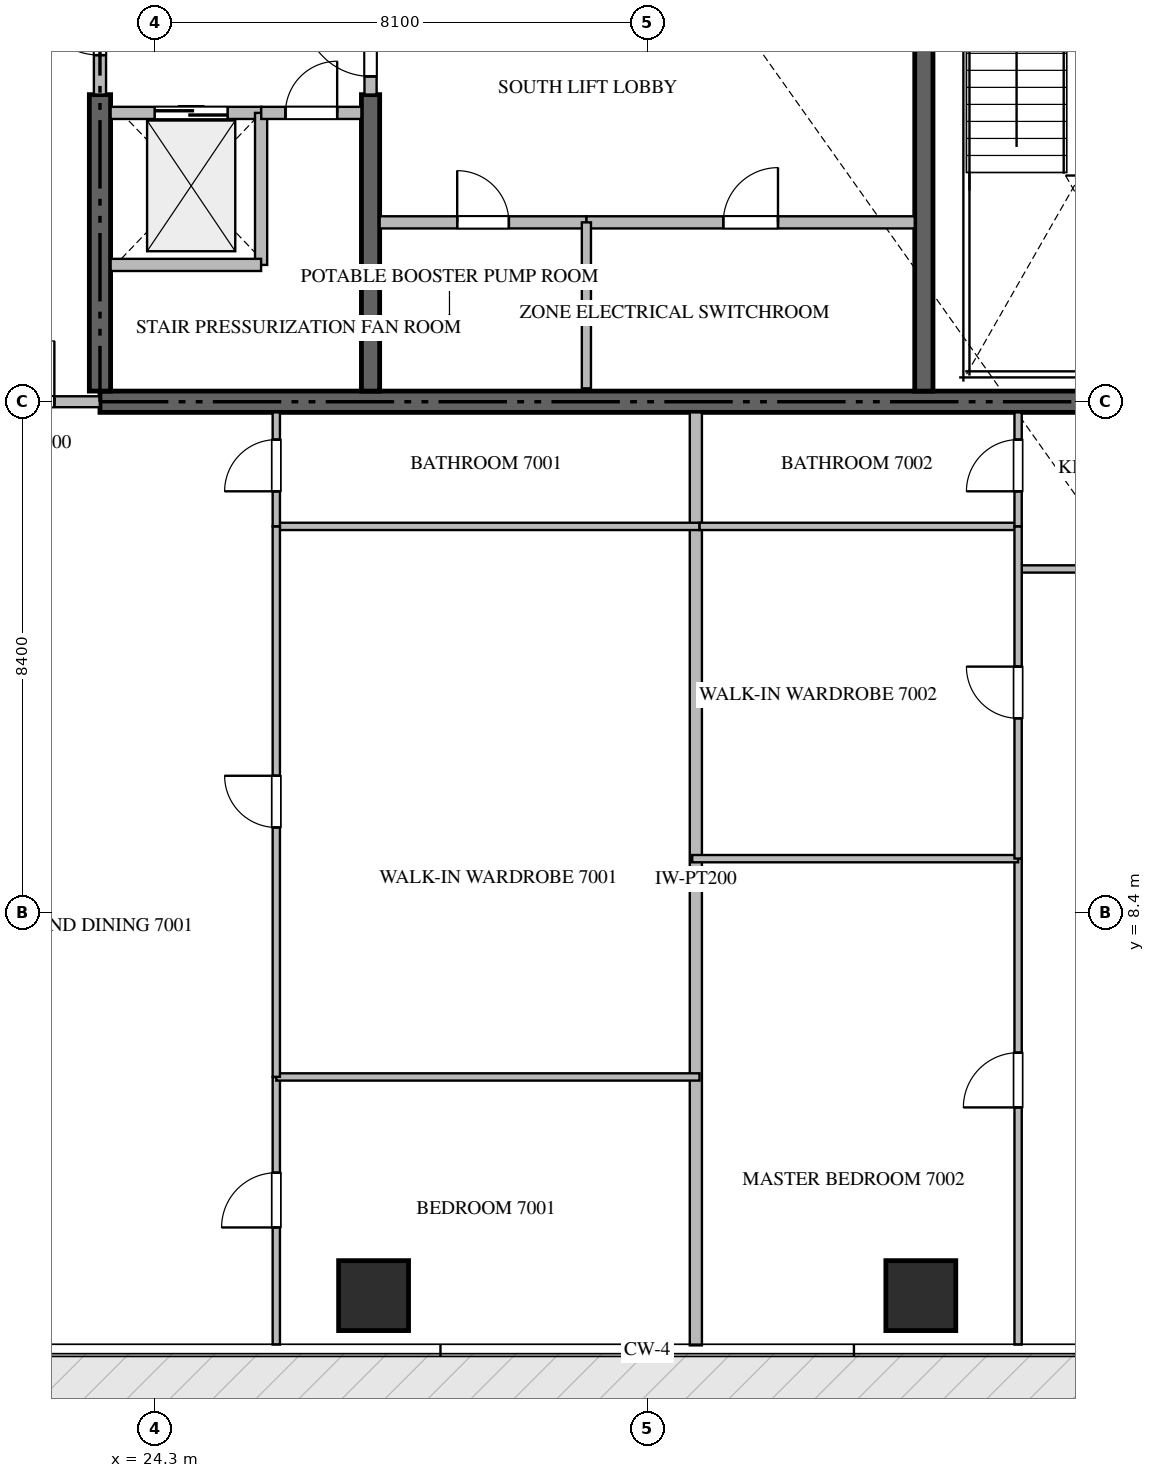
"""IFC4 building model, lengths in metres.
Left out: names, types, materials, properties, quantities, classifications, styles, units other than length and angle.
Written with IfcOpenShell. Run it as: python <this file> out.ifc"""

import sys

from ifc_helpers import new_model, si_unit, direction, frame, frame_2d, origin, origin_2d, place, context, subcontext, project, spatial, rectangle, extrude, source, transform, mapped, element, fill, save


model = new_model("IFC4")
c1 = context("Model", 3, precision=1e-05, world=origin(), true_north=direction((0.0, 1.0)))
c2 = subcontext(c1, "Body", "Model", "MODEL_VIEW")
j1 = project(units=[si_unit("LENGTHUNIT", "METRE"), si_unit("PLANEANGLEUNIT", "RADIAN")], contexts=[c1])
p1 = place(None, origin())
s1 = spatial("IfcSite", under=j1, at=p1, CompositionType="ELEMENT")
p2 = place(p1, origin())
s2 = spatial("IfcBuilding", under=s1, at=p2, CompositionType="ELEMENT")
p3 = place(p2, frame((0.0, 0.0, 279.75)))
s3 = spatial("IfcBuildingStorey", under=s2, at=p3, CompositionType="ELEMENT", Elevation=279.75)
p4 = place(p3, frame((23.4, 16.8, -0.26), z_axis=(0.0, 0.0, 1.0), x_axis=(1.0, 0.0, 0.0)))
e1 = element("IfcWall", 1, at=p4, inside=s3, PredefinedType="SHEAR", context=c2, shape_type="SweptSolid", body=[
    extrude(rectangle(XDim=18.0, YDim=0.35, at=frame_2d((9.0, 0.0))), origin(), (0.0, 0.0, 1.0), 3.848),
])
p5 = place(p3, frame((23.4, 16.975, -0.26), z_axis=(0.0, 0.0, 1.0), x_axis=(0.0, 1.0, 0.0)))
e2 = element("IfcWall", 2, at=p5, inside=s3, PredefinedType="SHEAR", context=c2, shape_type="SweptSolid", body=[
    extrude(rectangle(XDim=4.875, YDim=0.35, at=frame_2d((2.438, 0.0))), origin(), (0.0, 0.0, 1.0), 3.848),
])
p6 = place(p3, frame((27.85, 16.975, -0.26), z_axis=(0.0, 0.0, 1.0), x_axis=(0.0, 1.0, 0.0)))
e3 = element("IfcWall", 3, at=p6, inside=s3, PredefinedType="SHEAR", context=c2, shape_type="SweptSolid", body=[
    extrude(rectangle(XDim=4.875, YDim=0.3, at=frame_2d((2.438, 0.0))), origin(), (0.0, 0.0, 1.0), 3.848),
])
p7 = place(p3, frame((36.95, 16.975, -0.26), z_axis=(0.0, 0.0, 1.0), x_axis=(0.0, 1.0, 0.0)))
e4 = element("IfcWall", 4, at=p7, inside=s3, PredefinedType="SHEAR", context=c2, shape_type="SweptSolid", body=[
    extrude(rectangle(XDim=8.375, YDim=0.3, at=frame_2d((4.188, 0.0))), origin(), (0.0, 0.0, 1.0), 3.848),
])
m1 = source(origin(), c2, "Body", "SweptSolid", [
    extrude(rectangle(XDim=1.15, YDim=1.15, at=origin_2d()), origin(), (0.0, 0.0, 1.0), 3.85),
])
for number, where, z_axis, x_axis in (
    (5, (27.9, 2.1, -0.26), (0.0, 0.0, 1.0), (1.0, 0.0, 0.0)),
    (6, (36.9, 2.1, -0.26), (0.0, 0.0, 1.0), (1.0, 0.0, 0.0)),
):
    element("IfcColumn", number, at=place(p3, frame(where, z_axis=z_axis, x_axis=x_axis)), inside=s3, PredefinedType="COLUMN", context=c2, shape_type="MappedRepresentation", body=[
        mapped(m1, transform((0.0, 0.0, 0.0), scale=1.0)),
    ])
p8 = place(p3, frame((23.575, 21.55, 0.0), z_axis=(0.0, 0.0, 1.0), x_axis=(1.0, 0.0, 0.0)))
e7 = element("IfcWall", 7, at=p8, inside=s3, PredefinedType="STANDARD", context=c2, shape_type="SweptSolid", body=[
    extrude(rectangle(XDim=2.475, YDim=0.2, at=frame_2d((1.238, 0.0))), origin(), (0.0, 0.0, 1.0), 3.59),
])
p9 = place(p8, frame((0.725, 0.0, 0.0)))
e8 = element("IfcOpeningElement", 8, at=p9, cuts=e7, PredefinedType="OPENING", context=c2, shape_type="SweptSolid", body=[
    extrude(rectangle(XDim=1.2, YDim=2.2, at=frame_2d((0.6, 1.1))), frame((0.0, 0.11, 0.0), z_axis=(0.0, -1.0, 0.0), x_axis=(1.0, 0.0, 0.0)), (0.0, 0.0, 1.0), 0.22),
])
p10 = place(p3, frame((26.05, 19.05, 0.0), z_axis=(0.0, 0.0, 1.0), x_axis=(0.0, 1.0, 0.0)))
e9 = element("IfcWall", 9, at=p10, inside=s3, PredefinedType="STANDARD", context=c2, shape_type="SweptSolid", body=[
    extrude(rectangle(XDim=2.5, YDim=0.2, at=frame_2d((1.25, 0.0))), origin(), (0.0, 0.0, 1.0), 3.59),
])
p11 = place(p3, frame((23.575, 19.05, 0.0), z_axis=(0.0, 0.0, 1.0), x_axis=(1.0, 0.0, 0.0)))
e10 = element("IfcWall", 10, at=p11, inside=s3, PredefinedType="STANDARD", context=c2, shape_type="SweptSolid", body=[
    extrude(rectangle(XDim=2.475, YDim=0.2, at=frame_2d((1.238, 0.0))), origin(), (0.0, 0.0, 1.0), 3.59),
])
p12 = place(p3, frame((26.052, 21.55, 0.0), z_axis=(0.0, 0.0, 1.0), x_axis=(1.0, 0.0, 0.0)))
e11 = element("IfcWall", 11, at=p12, inside=s3, PredefinedType="STANDARD", context=c2, shape_type="SweptSolid", body=[
    extrude(rectangle(XDim=1.648, YDim=0.2, at=frame_2d((0.824, 0.0))), origin(), (0.0, 0.0, 1.0), 3.59),
])
p13 = place(p12, frame((0.399, 0.0, 0.0)))
e12 = element("IfcOpeningElement", 12, at=p13, cuts=e11, PredefinedType="OPENING", context=c2, shape_type="SweptSolid", body=[
    extrude(rectangle(XDim=0.85, YDim=2.1, at=frame_2d((0.425, 1.05))), frame((0.0, 0.11, 0.0), z_axis=(0.0, -1.0, 0.0), x_axis=(1.0, 0.0, 0.0)), (0.0, 0.0, 1.0), 0.22),
])
p14 = place(p3, frame((23.4, 21.852, 0.0), z_axis=(0.0, 0.0, 1.0), x_axis=(0.0, 1.0, 0.0)))
e13 = element("IfcWall", 13, at=p14, inside=s3, PredefinedType="STANDARD", context=c2, shape_type="SweptSolid", body=[
    extrude(rectangle(XDim=2.396, YDim=0.2, at=frame_2d((1.198, 0.0))), origin(), (0.0, 0.0, 1.0), 3.59),
])
p15 = place(p14, frame((0.648, 0.0, 0.0)))
e14 = element("IfcOpeningElement", 14, at=p15, cuts=e13, PredefinedType="OPENING", context=c2, shape_type="SweptSolid", body=[
    extrude(rectangle(XDim=1.1, YDim=2.15, at=frame_2d((0.55, 1.075))), frame((0.0, 0.11, 0.0), z_axis=(0.0, -1.0, 0.0), x_axis=(1.0, 0.0, 0.0)), (0.0, 0.0, 1.0), 0.22),
])
p16 = place(p3, frame((27.85, 21.852, 0.0), z_axis=(0.0, 0.0, 1.0), x_axis=(0.0, 1.0, 0.0)))
e15 = element("IfcWall", 15, at=p16, inside=s3, PredefinedType="STANDARD", context=c2, shape_type="SweptSolid", body=[
    extrude(rectangle(XDim=1.696, YDim=0.2, at=frame_2d((0.848, 0.0))), origin(), (0.0, 0.0, 1.0), 3.59),
])
p17 = place(p16, frame((0.298, 0.0, 0.0)))
e16 = element("IfcOpeningElement", 16, at=p17, cuts=e15, PredefinedType="OPENING", context=c2, shape_type="SweptSolid", body=[
    extrude(rectangle(XDim=1.1, YDim=2.15, at=frame_2d((0.55, 1.075))), frame((0.0, 0.11, 0.0), z_axis=(0.0, -1.0, 0.0), x_axis=(1.0, 0.0, 0.0)), (0.0, 0.0, 1.0), 0.22),
])
p18 = place(p3, frame((28.0, 19.75, 0.0), z_axis=(0.0, 0.0, 1.0), x_axis=(1.0, 0.0, 0.0)))
e17 = element("IfcWall", 17, at=p18, inside=s3, PredefinedType="STANDARD", context=c2, shape_type="SweptSolid", body=[
    extrude(rectangle(XDim=3.4, YDim=0.2, at=frame_2d((1.7, 0.0))), origin(), (0.0, 0.0, 1.0), 3.59),
])
p19 = place(p18, frame((1.275, 0.0, 0.0)))
e18 = element("IfcOpeningElement", 18, at=p19, cuts=e17, PredefinedType="OPENING", context=c2, shape_type="SweptSolid", body=[
    extrude(rectangle(XDim=0.85, YDim=2.1, at=frame_2d((0.425, 1.05))), frame((0.0, 0.11, 0.0), z_axis=(0.0, -1.0, 0.0), x_axis=(1.0, 0.0, 0.0)), (0.0, 0.0, 1.0), 0.22),
])
p20 = place(p3, frame((31.402, 19.75, 0.0), z_axis=(0.0, 0.0, 1.0), x_axis=(1.0, 0.0, 0.0)))
e19 = element("IfcWall", 19, at=p20, inside=s3, PredefinedType="STANDARD", context=c2, shape_type="SweptSolid", body=[
    extrude(rectangle(XDim=5.398, YDim=0.2, at=frame_2d((2.699, 0.0))), origin(), (0.0, 0.0, 1.0), 3.59),
])
p21 = place(p20, frame((2.249, 0.0, 0.0)))
e20 = element("IfcOpeningElement", 20, at=p21, cuts=e19, PredefinedType="OPENING", context=c2, shape_type="SweptSolid", body=[
    extrude(rectangle(XDim=0.9, YDim=2.1, at=frame_2d((0.45, 1.05))), frame((0.0, 0.11, 0.0), z_axis=(0.0, -1.0, 0.0), x_axis=(1.0, 0.0, 0.0)), (0.0, 0.0, 1.0), 0.22),
])
p22 = place(p3, frame((31.4, 17.02, 0.0), z_axis=(0.0, 0.0, 1.0), x_axis=(0.0, 1.0, 0.0)))
e21 = element("IfcWall", 21, at=p22, inside=s3, PredefinedType="PARTITIONING", context=c2, shape_type="SweptSolid", body=[
    extrude(rectangle(XDim=2.73, YDim=0.15, at=frame_2d((1.365, 0.0))), origin(), (0.0, 0.0, 1.0), 3.59),
])
p23 = place(p3, frame((33.2, 1.282, 0.0), z_axis=(0.0, 0.0, 1.0), x_axis=(0.0, 1.0, 0.0)))
e22 = element("IfcWall", 22, at=p23, inside=s3, PredefinedType="PARTITIONING", context=c2, shape_type="SweptSolid", body=[
    extrude(rectangle(XDim=15.343, YDim=0.2, at=frame_2d((7.671, 0.0))), origin(), (0.0, 0.0, 1.0), 3.59),
])
p24 = place(p3, frame((20.902, 16.8, 0.0), z_axis=(0.0, 0.0, 1.0), x_axis=(1.0, 0.0, 0.0)))
e23 = element("IfcWall", 23, at=p24, inside=s3, PredefinedType="PARTITIONING", context=c2, shape_type="SweptSolid", body=[
    extrude(rectangle(XDim=2.496, YDim=0.18, at=frame_2d((1.248, 0.0))), origin(), (0.0, 0.0, 1.0), 3.59),
])
p25 = place(p24, frame((0.748, 0.0, 0.0)))
e24 = element("IfcOpeningElement", 24, at=p25, cuts=e23, PredefinedType="OPENING", context=c2, shape_type="SweptSolid", body=[
    extrude(rectangle(XDim=1.0, YDim=2.15, at=frame_2d((0.5, 1.075))), frame((0.0, 0.1, 0.0), z_axis=(0.0, -1.0, 0.0), x_axis=(1.0, 0.0, 0.0)), (0.0, 0.0, 1.0), 0.2),
])
p26 = place(p3, frame((26.3, 1.295, 0.0), z_axis=(0.0, 0.0, 1.0), x_axis=(0.0, 1.0, 0.0)))
e25 = element("IfcWall", 25, at=p26, inside=s3, PredefinedType="PARTITIONING", context=c2, shape_type="SweptSolid", body=[
    extrude(rectangle(XDim=4.401, YDim=0.12, at=frame_2d((2.201, 0.0))), origin(), (0.0, 0.0, 1.0), 3.59),
])
p27 = place(p26, frame((1.926, 0.0, 0.0)))
e26 = element("IfcOpeningElement", 26, at=p27, cuts=e25, PredefinedType="OPENING", context=c2, shape_type="SweptSolid", body=[
    extrude(rectangle(XDim=0.9, YDim=2.1, at=frame_2d((0.45, 1.05))), frame((0.0, 0.07, 0.0), z_axis=(0.0, -1.0, 0.0), x_axis=(1.0, 0.0, 0.0)), (0.0, 0.0, 1.0), 0.14),
])
for number, where, z_axis, x_axis in (
    (27, (26.3, 5.696, 0.0), (0.0, 0.0, 1.0), (1.0, 0.0, 0.0)),
    (28, (26.3, 14.75, 0.0), (0.0, 0.0, 1.0), (1.0, 0.0, 0.0)),
):
    element("IfcWall", number, at=place(p3, frame(where, z_axis=z_axis, x_axis=x_axis)), inside=s3, PredefinedType="PARTITIONING", context=c2, shape_type="SweptSolid", body=[
        extrude(rectangle(XDim=6.96, YDim=0.12, at=frame_2d((3.48, 0.0))), origin(), (0.0, 0.0, 1.0), 3.59),
    ])
p28 = place(p3, frame((26.3, 5.698, 0.0), z_axis=(0.0, 0.0, 1.0), x_axis=(0.0, 1.0, 0.0)))
e29 = element("IfcWall", 29, at=p28, inside=s3, PredefinedType="PARTITIONING", context=c2, shape_type="SweptSolid", body=[
    extrude(rectangle(XDim=9.052, YDim=0.12, at=frame_2d((4.526, 0.0))), origin(), (0.0, 0.0, 1.0), 3.59),
])
p29 = place(p28, frame((4.101, 0.0, 0.0)))
e30 = element("IfcOpeningElement", 30, at=p29, cuts=e29, PredefinedType="OPENING", context=c2, shape_type="SweptSolid", body=[
    extrude(rectangle(XDim=0.85, YDim=2.1, at=frame_2d((0.425, 1.05))), frame((0.0, 0.07, 0.0), z_axis=(0.0, -1.0, 0.0), x_axis=(1.0, 0.0, 0.0)), (0.0, 0.0, 1.0), 0.14),
])
p30 = place(p3, frame((26.3, 14.752, 0.0), z_axis=(0.0, 0.0, 1.0), x_axis=(0.0, 1.0, 0.0)))
e31 = element("IfcWall", 31, at=p30, inside=s3, PredefinedType="PARTITIONING", context=c2, shape_type="SweptSolid", body=[
    extrude(rectangle(XDim=1.873, YDim=0.12, at=frame_2d((0.937, 0.0))), origin(), (0.0, 0.0, 1.0), 3.59),
])
p31 = place(p30, frame((0.575, 0.0, 0.0)))
e32 = element("IfcOpeningElement", 32, at=p31, cuts=e31, PredefinedType="OPENING", context=c2, shape_type="SweptSolid", body=[
    extrude(rectangle(XDim=0.85, YDim=2.1, at=frame_2d((0.425, 1.05))), frame((0.0, 0.07, 0.0), z_axis=(0.0, -1.0, 0.0), x_axis=(1.0, 0.0, 0.0)), (0.0, 0.0, 1.0), 0.14),
])
p32 = place(p3, frame((38.5, 14.05, 0.0), z_axis=(0.0, 0.0, 1.0), x_axis=(1.0, 0.0, 0.0)))
e33 = element("IfcWall", 33, at=p32, inside=s3, PredefinedType="PARTITIONING", context=c2, shape_type="SweptSolid", body=[
    extrude(rectangle(XDim=2.85, YDim=0.12, at=frame_2d((1.425, 0.0))), origin(), (0.0, 0.0, 1.0), 3.59),
])
p33 = place(p32, frame((1.0, 0.0, 0.0)))
e34 = element("IfcOpeningElement", 34, at=p33, cuts=e33, PredefinedType="OPENING", context=c2, shape_type="SweptSolid", body=[
    extrude(rectangle(XDim=0.85, YDim=2.1, at=frame_2d((0.425, 1.05))), frame((0.0, 0.07, 0.0), z_axis=(0.0, -1.0, 0.0), x_axis=(1.0, 0.0, 0.0)), (0.0, 0.0, 1.0), 0.14),
])
p34 = place(p3, frame((38.5, 1.295, 0.0), z_axis=(0.0, 0.0, 1.0), x_axis=(0.0, 1.0, 0.0)))
e35 = element("IfcWall", 35, at=p34, inside=s3, PredefinedType="PARTITIONING", context=c2, shape_type="SweptSolid", body=[
    extrude(rectangle(XDim=7.991, YDim=0.12, at=frame_2d((3.996, 0.0))), origin(), (0.0, 0.0, 1.0), 3.59),
])
p35 = place(p34, frame((3.9, 0.0, 0.0)))
e36 = element("IfcOpeningElement", 36, at=p35, cuts=e35, PredefinedType="OPENING", context=c2, shape_type="SweptSolid", body=[
    extrude(rectangle(XDim=0.9, YDim=2.1, at=frame_2d((0.45, 1.05))), frame((0.0, 0.07, 0.0), z_axis=(0.0, -1.0, 0.0), x_axis=(1.0, 0.0, 0.0)), (0.0, 0.0, 1.0), 0.14),
])
p36 = place(p3, frame((33.14, 9.286, 0.0), z_axis=(0.0, 0.0, 1.0), x_axis=(1.0, 0.0, 0.0)))
e37 = element("IfcWall", 37, at=p36, inside=s3, PredefinedType="PARTITIONING", context=c2, shape_type="SweptSolid", body=[
    extrude(rectangle(XDim=5.36, YDim=0.12, at=frame_2d((2.68, 0.0))), origin(), (0.0, 0.0, 1.0), 3.59),
])
p37 = place(p3, frame((33.262, 14.75, 0.0), z_axis=(0.0, 0.0, 1.0), x_axis=(1.0, 0.0, 0.0)))
e38 = element("IfcWall", 38, at=p37, inside=s3, PredefinedType="PARTITIONING", context=c2, shape_type="SweptSolid", body=[
    extrude(rectangle(XDim=5.238, YDim=0.12, at=frame_2d((2.619, 0.0))), origin(), (0.0, 0.0, 1.0), 3.59),
])
p38 = place(p3, frame((38.5, 9.288, 0.0), z_axis=(0.0, 0.0, 1.0), x_axis=(0.0, 1.0, 0.0)))
e39 = element("IfcWall", 39, at=p38, inside=s3, PredefinedType="PARTITIONING", context=c2, shape_type="SweptSolid", body=[
    extrude(rectangle(XDim=5.462, YDim=0.12, at=frame_2d((2.731, 0.0))), origin(), (0.0, 0.0, 1.0), 3.59),
])
p39 = place(p38, frame((2.306, 0.0, 0.0)))
e40 = element("IfcOpeningElement", 40, at=p39, cuts=e39, PredefinedType="OPENING", context=c2, shape_type="SweptSolid", body=[
    extrude(rectangle(XDim=0.85, YDim=2.1, at=frame_2d((0.425, 1.05))), frame((0.0, 0.07, 0.0), z_axis=(0.0, -1.0, 0.0), x_axis=(1.0, 0.0, 0.0)), (0.0, 0.0, 1.0), 0.14),
])
p40 = place(p3, frame((38.5, 14.752, 0.0), z_axis=(0.0, 0.0, 1.0), x_axis=(0.0, 1.0, 0.0)))
e41 = element("IfcWall", 41, at=p40, inside=s3, PredefinedType="PARTITIONING", context=c2, shape_type="SweptSolid", body=[
    extrude(rectangle(XDim=1.873, YDim=0.12, at=frame_2d((0.937, 0.0))), origin(), (0.0, 0.0, 1.0), 3.59),
])
p41 = place(p40, frame((0.575, 0.0, 0.0)))
e42 = element("IfcOpeningElement", 42, at=p41, cuts=e41, PredefinedType="OPENING", context=c2, shape_type="SweptSolid", body=[
    extrude(rectangle(XDim=0.85, YDim=2.1, at=frame_2d((0.425, 1.05))), frame((0.0, 0.07, 0.0), z_axis=(0.0, -1.0, 0.0), x_axis=(1.0, 0.0, 0.0)), (0.0, 0.0, 1.0), 0.14),
])
m2 = source(origin(), c2, "Body", "SweptSolid", [
    extrude(rectangle(XDim=1.2, YDim=2.2, at=frame_2d((0.6, 1.1))), frame((0.0, 0.025, 0.0), z_axis=(0.0, -1.0, 0.0), x_axis=(1.0, 0.0, 0.0)), (0.0, 0.0, 1.0), 0.05),
])
p42 = place(p9, origin())
e43 = element("IfcDoor", 43, at=p42, inside=s3, OperationType="DOUBLE_DOOR_SLIDING", PredefinedType="DOOR", context=c2, shape_type="MappedRepresentation", body=[
    mapped(m2, transform((0.0, 0.0, 0.0), scale=1.0)),
])
fill(e8, e43)
m3 = source(origin(), c2, "Body", "SweptSolid", [
    extrude(rectangle(XDim=0.85, YDim=2.1, at=frame_2d((0.425, 1.05))), frame((0.0, 0.025, 0.0), z_axis=(0.0, -1.0, 0.0), x_axis=(1.0, 0.0, 0.0)), (0.0, 0.0, 1.0), 0.05),
])
p43 = place(p13, origin())
e44 = element("IfcDoor", 44, at=p43, inside=s3, OperationType="SINGLE_SWING_RIGHT", PredefinedType="DOOR", context=c2, shape_type="MappedRepresentation", body=[
    mapped(m3, transform((0.0, 0.0, 0.0), scale=1.0)),
])
fill(e12, e44)
m4 = source(origin(), c2, "Body", "SweptSolid", [
    extrude(rectangle(XDim=1.1, YDim=2.15, at=frame_2d((0.55, 1.075))), frame((0.0, 0.025, 0.0), z_axis=(0.0, -1.0, 0.0), x_axis=(1.0, 0.0, 0.0)), (0.0, 0.0, 1.0), 0.05),
])
p44 = place(p15, origin())
e45 = element("IfcDoor", 45, at=p44, inside=s3, OperationType="SINGLE_SWING_RIGHT", PredefinedType="DOOR", context=c2, shape_type="MappedRepresentation", body=[
    mapped(m4, transform((0.0, 0.0, 0.0), scale=1.0)),
])
fill(e14, e45)
p45 = place(p17, origin())
e46 = element("IfcDoor", 46, at=p45, inside=s3, OperationType="SINGLE_SWING_RIGHT", PredefinedType="DOOR", context=c2, shape_type="MappedRepresentation", body=[
    mapped(m4, transform((0.0, 0.0, 0.0), scale=1.0)),
])
fill(e16, e46)
p46 = place(p19, origin())
e47 = element("IfcDoor", 47, at=p46, inside=s3, OperationType="SINGLE_SWING_LEFT", PredefinedType="DOOR", context=c2, shape_type="MappedRepresentation", body=[
    mapped(m3, transform((0.0, 0.0, 0.0), scale=1.0)),
])
fill(e18, e47)
m5 = source(origin(), c2, "Body", "SweptSolid", [
    extrude(rectangle(XDim=0.9, YDim=2.1, at=frame_2d((0.45, 1.05))), frame((0.0, 0.025, 0.0), z_axis=(0.0, -1.0, 0.0), x_axis=(1.0, 0.0, 0.0)), (0.0, 0.0, 1.0), 0.05),
])
p47 = place(p21, origin())
e48 = element("IfcDoor", 48, at=p47, inside=s3, OperationType="SINGLE_SWING_RIGHT", PredefinedType="DOOR", context=c2, shape_type="MappedRepresentation", body=[
    mapped(m5, transform((0.0, 0.0, 0.0), scale=1.0)),
])
fill(e20, e48)
m6 = source(origin(), c2, "Body", "SweptSolid", [
    extrude(rectangle(XDim=1.0, YDim=2.15, at=frame_2d((0.5, 1.075))), frame((0.0, 0.025, 0.0), z_axis=(0.0, -1.0, 0.0), x_axis=(1.0, 0.0, 0.0)), (0.0, 0.0, 1.0), 0.05),
])
p48 = place(p25, origin())
e49 = element("IfcDoor", 49, at=p48, inside=s3, OperationType="SINGLE_SWING_RIGHT", PredefinedType="DOOR", context=c2, shape_type="MappedRepresentation", body=[
    mapped(m6, transform((0.0, 0.0, 0.0), scale=1.0)),
])
fill(e24, e49)
p49 = place(p27, origin())
e50 = element("IfcDoor", 50, at=p49, inside=s3, OperationType="SINGLE_SWING_LEFT", PredefinedType="DOOR", context=c2, shape_type="MappedRepresentation", body=[
    mapped(m5, transform((0.0, 0.0, 0.0), scale=1.0)),
])
fill(e26, e50)
p50 = place(p29, origin())
e51 = element("IfcDoor", 51, at=p50, inside=s3, OperationType="SINGLE_SWING_RIGHT", PredefinedType="DOOR", context=c2, shape_type="MappedRepresentation", body=[
    mapped(m3, transform((0.0, 0.0, 0.0), scale=1.0)),
])
fill(e30, e51)
p51 = place(p31, origin())
e52 = element("IfcDoor", 52, at=p51, inside=s3, OperationType="SINGLE_SWING_LEFT", PredefinedType="DOOR", context=c2, shape_type="MappedRepresentation", body=[
    mapped(m3, transform((0.0, 0.0, 0.0), scale=1.0)),
])
fill(e32, e52)
p52 = place(p35, origin())
e53 = element("IfcDoor", 53, at=p52, inside=s3, OperationType="SINGLE_SWING_LEFT", PredefinedType="DOOR", context=c2, shape_type="MappedRepresentation", body=[
    mapped(m5, transform((0.0, 0.0, 0.0), scale=1.0)),
])
fill(e36, e53)
p53 = place(p39, origin())
e54 = element("IfcDoor", 54, at=p53, inside=s3, OperationType="SINGLE_SWING_RIGHT", PredefinedType="DOOR", context=c2, shape_type="MappedRepresentation", body=[
    mapped(m3, transform((0.0, 0.0, 0.0), scale=1.0)),
])
fill(e40, e54)
p54 = place(p41, origin())
e55 = element("IfcDoor", 55, at=p54, inside=s3, OperationType="SINGLE_SWING_LEFT", PredefinedType="DOOR", context=c2, shape_type="MappedRepresentation", body=[
    mapped(m3, transform((0.0, 0.0, 0.0), scale=1.0)),
])
fill(e42, e55)
save(model, sys.argv[1])
